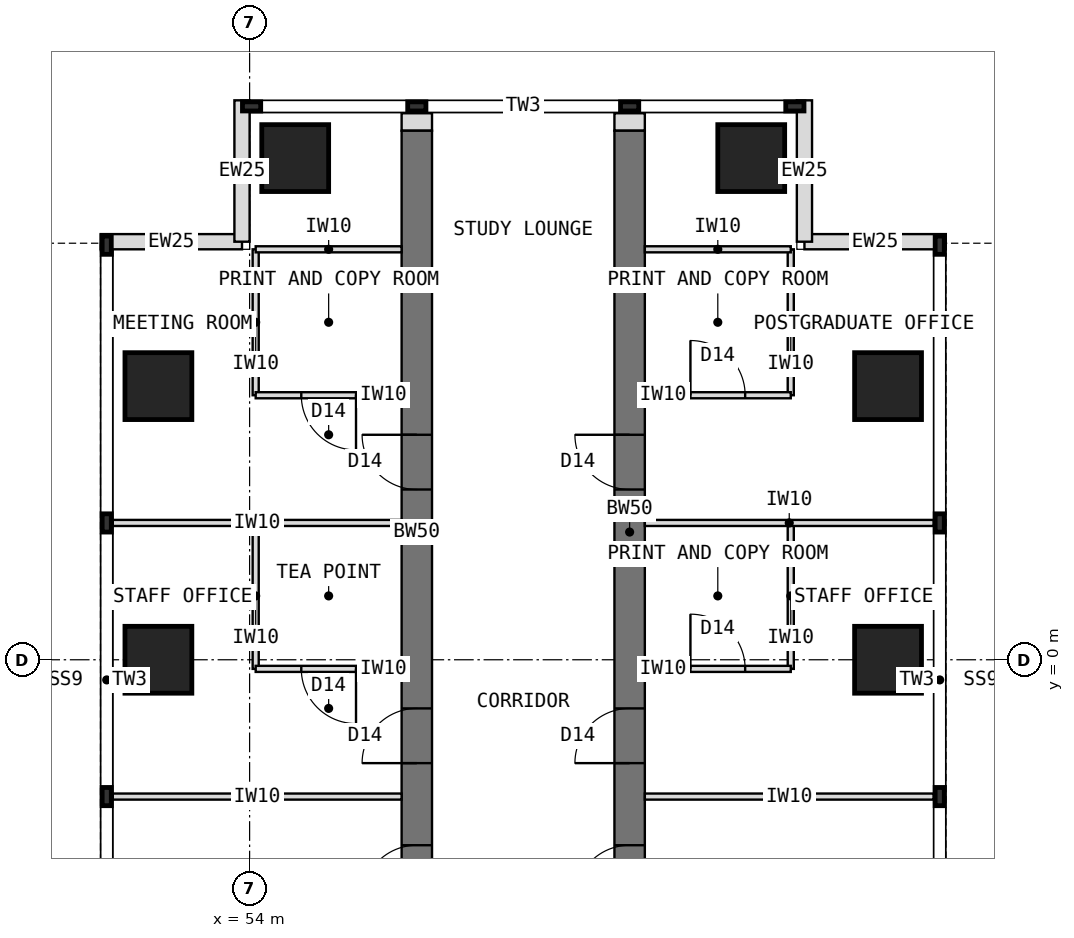
"""IFC4 building model, lengths in metres.
Left out: names, types, materials, properties, quantities, classifications, styles, units other than length and angle.
Written with IfcOpenShell. Run it as: python <this file> out.ifc"""

import sys

from ifc_helpers import new_model, si_unit, direction, frame, frame_2d, origin, origin_2d, place, context, subcontext, project, spatial, rectangle, extrude, element, fill, save


model = new_model("IFC4")
c1 = context("Model", 3, precision=1e-05, world=origin(), true_north=direction((0.0, 1.0)))
c2 = subcontext(c1, "Body", "Model", "MODEL_VIEW")
j1 = project(units=[si_unit("LENGTHUNIT", "METRE"), si_unit("PLANEANGLEUNIT", "RADIAN")], contexts=[c1])
p1 = place(None, origin())
s1 = spatial("IfcSite", under=j1, at=p1, CompositionType="ELEMENT")
p2 = place(p1, origin())
s2 = spatial("IfcBuilding", under=s1, at=p2, CompositionType="ELEMENT")
p3 = place(p2, frame((0.0, 0.0, 218.5)))
s3 = spatial("IfcBuildingStorey", under=s2, at=p3, CompositionType="ELEMENT", Elevation=218.5)
p4 = place(p3, frame((56.75, -4.5, 0.0), z_axis=(0.0, 0.0, 1.0), x_axis=(0.0, 1.0, 0.0)))
e1 = element("IfcWall", 1, at=p4, inside=s3, PredefinedType="SHEAR", context=c2, shape_type="SweptSolid", body=[
    extrude(rectangle(XDim=13.2, YDim=0.5, at=frame_2d((6.6, 0.0))), origin(), (0.0, 0.0, 1.0), 4.0),
])
p5 = place(p4, frame((0.55, 0.0, 0.0)))
e2 = element("IfcOpeningElement", 2, at=p5, cuts=e1, PredefinedType="OPENING", context=c2, shape_type="SweptSolid", body=[
    extrude(rectangle(XDim=0.9, YDim=2.1, at=frame_2d((0.45, 1.05))), frame((0.0, 0.26, 0.0), z_axis=(0.0, -1.0, 0.0), x_axis=(1.0, 0.0, 0.0)), (0.0, 0.0, 1.0), 0.52),
])
p6 = place(p4, frame((2.8, 0.0, 0.0)))
e3 = element("IfcOpeningElement", 3, at=p6, cuts=e1, PredefinedType="OPENING", context=c2, shape_type="SweptSolid", body=[
    extrude(rectangle(XDim=0.9, YDim=2.1, at=frame_2d((0.45, 1.05))), frame((0.0, 0.26, 0.0), z_axis=(0.0, -1.0, 0.0), x_axis=(1.0, 0.0, 0.0)), (0.0, 0.0, 1.0), 0.52),
])
p7 = place(p4, frame((7.3, 0.0, 0.0)))
e4 = element("IfcOpeningElement", 4, at=p7, cuts=e1, PredefinedType="OPENING", context=c2, shape_type="SweptSolid", body=[
    extrude(rectangle(XDim=0.9, YDim=2.1, at=frame_2d((0.45, 1.05))), frame((0.0, 0.26, 0.0), z_axis=(0.0, -1.0, 0.0), x_axis=(1.0, 0.0, 0.0)), (0.0, 0.0, 1.0), 0.52),
])
p8 = place(p3, frame((60.25, -4.5, 0.0), z_axis=(0.0, 0.0, 1.0), x_axis=(0.0, 1.0, 0.0)))
e5 = element("IfcWall", 5, at=p8, inside=s3, PredefinedType="SHEAR", context=c2, shape_type="SweptSolid", body=[
    extrude(rectangle(XDim=13.2, YDim=0.5, at=frame_2d((6.6, 0.0))), origin(), (0.0, 0.0, 1.0), 4.0),
])
p9 = place(p8, frame((0.55, 0.0, 0.0)))
e6 = element("IfcOpeningElement", 6, at=p9, cuts=e5, PredefinedType="OPENING", context=c2, shape_type="SweptSolid", body=[
    extrude(rectangle(XDim=0.9, YDim=2.1, at=frame_2d((0.45, 1.05))), frame((0.0, 0.26, 0.0), z_axis=(0.0, -1.0, 0.0), x_axis=(1.0, 0.0, 0.0)), (0.0, 0.0, 1.0), 0.52),
])
p10 = place(p8, frame((2.8, 0.0, 0.0)))
e7 = element("IfcOpeningElement", 7, at=p10, cuts=e5, PredefinedType="OPENING", context=c2, shape_type="SweptSolid", body=[
    extrude(rectangle(XDim=0.9, YDim=2.1, at=frame_2d((0.45, 1.05))), frame((0.0, 0.26, 0.0), z_axis=(0.0, -1.0, 0.0), x_axis=(1.0, 0.0, 0.0)), (0.0, 0.0, 1.0), 0.52),
])
p11 = place(p8, frame((7.3, 0.0, 0.0)))
e8 = element("IfcOpeningElement", 8, at=p11, cuts=e5, PredefinedType="OPENING", context=c2, shape_type="SweptSolid", body=[
    extrude(rectangle(XDim=0.9, YDim=2.1, at=frame_2d((0.45, 1.05))), frame((0.0, 0.26, 0.0), z_axis=(0.0, -1.0, 0.0), x_axis=(1.0, 0.0, 0.0)), (0.0, 0.0, 1.0), 0.52),
])
for number, where, z_axis, x_axis in (
    (9, (52.5, 0.0, 0.0), (0.0, 0.0, 1.0), (1.0, 0.0, 0.0)),
    (10, (64.5, 0.0, 0.0), (0.0, 0.0, 1.0), (1.0, 0.0, 0.0)),
    (11, (52.5, 4.5, 0.0), (0.0, 0.0, 1.0), (1.0, 0.0, 0.0)),
    (12, (64.5, 4.5, 0.0), (0.0, 0.0, 1.0), (1.0, 0.0, 0.0)),
    (13, (54.75, 8.25, 0.0), (0.0, 0.0, 1.0), (1.0, 0.0, 0.0)),
    (14, (62.25, 8.25, 0.0), (0.0, 0.0, 1.0), (1.0, 0.0, 0.0)),
):
    element("IfcColumn", number, at=place(p3, frame(where, z_axis=z_axis, x_axis=x_axis)), inside=s3, PredefinedType="COLUMN", context=c2, shape_type="SweptSolid", body=[
        extrude(rectangle(XDim=1.1, YDim=1.1, at=origin_2d()), origin(), (0.0, 0.0, 1.0), 4.0),
    ])
for number, where, z_axis, x_axis in (
    (15, (51.55, 6.875, 0.0), (0.0, 0.0, 1.0), (1.0, 0.0, 0.0)),
    (16, (53.875, 6.875, 0.0), (0.0, 0.0, 1.0), (0.0, 1.0, 0.0)),
    (17, (65.45, 6.875, 0.0), (0.0, 0.0, 1.0), (-1.0, 0.0, 0.0)),
    (18, (63.125, 6.875, 0.0), (0.0, 0.0, 1.0), (0.0, 1.0, 0.0)),
):
    element("IfcWall", number, at=place(p3, frame(where, z_axis=z_axis, x_axis=x_axis)), inside=s3, PredefinedType="STANDARD", context=c2, shape_type="SweptSolid", body=[
        extrude(rectangle(XDim=2.325, YDim=0.25, at=frame_2d((1.163, 0.0))), origin(), (0.0, 0.0, 1.0), 3.8),
    ])
for number, where, z_axis, x_axis in (
    (19, (56.75, 8.7, 0.0), (0.0, 0.0, 1.0), (0.0, 1.0, 0.0)),
    (20, (60.25, 8.7, 0.0), (0.0, 0.0, 1.0), (0.0, 1.0, 0.0)),
):
    element("IfcWall", number, at=place(p3, frame(where, z_axis=z_axis, x_axis=x_axis)), inside=s3, PredefinedType="PARTITIONING", context=c2, shape_type="SweptSolid", body=[
        extrude(rectangle(XDim=0.288, YDim=0.5, at=frame_2d((0.144, 0.0))), origin(), (0.0, 0.0, 1.0), 3.8),
    ])
for number, where, z_axis, x_axis in (
    (21, (56.5, -2.25, 0.0), (0.0, 0.0, 1.0), (-1.0, 0.0, 0.0)),
    (22, (56.5, 2.25, 0.0), (0.0, 0.0, 1.0), (-1.0, 0.0, 0.0)),
):
    element("IfcWall", number, at=place(p3, frame(where, z_axis=z_axis, x_axis=x_axis)), inside=s3, PredefinedType="PARTITIONING", context=c2, shape_type="SweptSolid", body=[
        extrude(rectangle(XDim=4.75, YDim=0.1, at=frame_2d((2.375, 0.0))), origin(), (0.0, 0.0, 1.0), 3.8),
    ])
p12 = place(p3, frame((54.1, -0.15, 0.0), z_axis=(0.0, 0.0, 1.0), x_axis=(0.0, 1.0, 0.0)))
e23 = element("IfcWall", 23, at=p12, inside=s3, PredefinedType="PARTITIONING", context=c2, shape_type="SweptSolid", body=[
    extrude(rectangle(XDim=2.4, YDim=0.1, at=frame_2d((1.2, 0.0))), origin(), (0.0, 0.0, 1.0), 3.8),
])
p13 = place(p3, frame((56.5, -0.15, 0.0), z_axis=(0.0, 0.0, 1.0), x_axis=(-1.0, 0.0, 0.0)))
e24 = element("IfcWall", 24, at=p13, inside=s3, PredefinedType="PARTITIONING", context=c2, shape_type="SweptSolid", body=[
    extrude(rectangle(XDim=2.4, YDim=0.1, at=frame_2d((1.2, 0.0))), origin(), (0.0, 0.0, 1.0), 3.8),
])
p14 = place(p13, frame((0.75, 0.0, 0.0)))
e25 = element("IfcOpeningElement", 25, at=p14, cuts=e24, PredefinedType="OPENING", context=c2, shape_type="SweptSolid", body=[
    extrude(rectangle(XDim=0.9, YDim=2.1, at=frame_2d((0.45, 1.05))), frame((0.0, 0.06, 0.0), z_axis=(0.0, -1.0, 0.0), x_axis=(1.0, 0.0, 0.0)), (0.0, 0.0, 1.0), 0.12),
])
p15 = place(p3, frame((54.1, 4.35, 0.0), z_axis=(0.0, 0.0, 1.0), x_axis=(0.0, 1.0, 0.0)))
e26 = element("IfcWall", 26, at=p15, inside=s3, PredefinedType="PARTITIONING", context=c2, shape_type="SweptSolid", body=[
    extrude(rectangle(XDim=2.4, YDim=0.1, at=frame_2d((1.2, 0.0))), origin(), (0.0, 0.0, 1.0), 3.8),
])
p16 = place(p3, frame((56.5, 4.35, 0.0), z_axis=(0.0, 0.0, 1.0), x_axis=(-1.0, 0.0, 0.0)))
e27 = element("IfcWall", 27, at=p16, inside=s3, PredefinedType="PARTITIONING", context=c2, shape_type="SweptSolid", body=[
    extrude(rectangle(XDim=2.4, YDim=0.1, at=frame_2d((1.2, 0.0))), origin(), (0.0, 0.0, 1.0), 3.8),
])
p17 = place(p16, frame((0.75, 0.0, 0.0)))
e28 = element("IfcOpeningElement", 28, at=p17, cuts=e27, PredefinedType="OPENING", context=c2, shape_type="SweptSolid", body=[
    extrude(rectangle(XDim=0.9, YDim=2.1, at=frame_2d((0.45, 1.05))), frame((0.0, 0.06, 0.0), z_axis=(0.0, -1.0, 0.0), x_axis=(1.0, 0.0, 0.0)), (0.0, 0.0, 1.0), 0.12),
])
p18 = place(p3, frame((56.5, 6.75, 0.0), z_axis=(0.0, 0.0, 1.0), x_axis=(-1.0, 0.0, 0.0)))
e29 = element("IfcWall", 29, at=p18, inside=s3, PredefinedType="PARTITIONING", context=c2, shape_type="SweptSolid", body=[
    extrude(rectangle(XDim=2.4, YDim=0.1, at=frame_2d((1.2, 0.0))), origin(), (0.0, 0.0, 1.0), 3.8),
])
for number, where, z_axis, x_axis in (
    (30, (60.5, -2.25, 0.0), (0.0, 0.0, 1.0), (1.0, 0.0, 0.0)),
    (31, (60.5, 2.25, 0.0), (0.0, 0.0, 1.0), (1.0, 0.0, 0.0)),
):
    element("IfcWall", number, at=place(p3, frame(where, z_axis=z_axis, x_axis=x_axis)), inside=s3, PredefinedType="PARTITIONING", context=c2, shape_type="SweptSolid", body=[
        extrude(rectangle(XDim=4.75, YDim=0.1, at=frame_2d((2.375, 0.0))), origin(), (0.0, 0.0, 1.0), 3.8),
    ])
p19 = place(p3, frame((62.9, -0.15, 0.0), z_axis=(0.0, 0.0, 1.0), x_axis=(0.0, 1.0, 0.0)))
e32 = element("IfcWall", 32, at=p19, inside=s3, PredefinedType="PARTITIONING", context=c2, shape_type="SweptSolid", body=[
    extrude(rectangle(XDim=2.4, YDim=0.1, at=frame_2d((1.2, 0.0))), origin(), (0.0, 0.0, 1.0), 3.8),
])
p20 = place(p3, frame((60.5, -0.15, 0.0), z_axis=(0.0, 0.0, 1.0), x_axis=(1.0, 0.0, 0.0)))
e33 = element("IfcWall", 33, at=p20, inside=s3, PredefinedType="PARTITIONING", context=c2, shape_type="SweptSolid", body=[
    extrude(rectangle(XDim=2.4, YDim=0.1, at=frame_2d((1.2, 0.0))), origin(), (0.0, 0.0, 1.0), 3.8),
])
p21 = place(p20, frame((0.75, 0.0, 0.0)))
e34 = element("IfcOpeningElement", 34, at=p21, cuts=e33, PredefinedType="OPENING", context=c2, shape_type="SweptSolid", body=[
    extrude(rectangle(XDim=0.9, YDim=2.1, at=frame_2d((0.45, 1.05))), frame((0.0, 0.06, 0.0), z_axis=(0.0, -1.0, 0.0), x_axis=(1.0, 0.0, 0.0)), (0.0, 0.0, 1.0), 0.12),
])
p22 = place(p3, frame((62.9, 4.35, 0.0), z_axis=(0.0, 0.0, 1.0), x_axis=(0.0, 1.0, 0.0)))
e35 = element("IfcWall", 35, at=p22, inside=s3, PredefinedType="PARTITIONING", context=c2, shape_type="SweptSolid", body=[
    extrude(rectangle(XDim=2.4, YDim=0.1, at=frame_2d((1.2, 0.0))), origin(), (0.0, 0.0, 1.0), 3.8),
])
p23 = place(p3, frame((60.5, 4.35, 0.0), z_axis=(0.0, 0.0, 1.0), x_axis=(1.0, 0.0, 0.0)))
e36 = element("IfcWall", 36, at=p23, inside=s3, PredefinedType="PARTITIONING", context=c2, shape_type="SweptSolid", body=[
    extrude(rectangle(XDim=2.4, YDim=0.1, at=frame_2d((1.2, 0.0))), origin(), (0.0, 0.0, 1.0), 3.8),
])
p24 = place(p23, frame((0.75, 0.0, 0.0)))
e37 = element("IfcOpeningElement", 37, at=p24, cuts=e36, PredefinedType="OPENING", context=c2, shape_type="SweptSolid", body=[
    extrude(rectangle(XDim=0.9, YDim=2.1, at=frame_2d((0.45, 1.05))), frame((0.0, 0.06, 0.0), z_axis=(0.0, -1.0, 0.0), x_axis=(1.0, 0.0, 0.0)), (0.0, 0.0, 1.0), 0.12),
])
p25 = place(p3, frame((60.5, 6.75, 0.0), z_axis=(0.0, 0.0, 1.0), x_axis=(1.0, 0.0, 0.0)))
e38 = element("IfcWall", 38, at=p25, inside=s3, PredefinedType="PARTITIONING", context=c2, shape_type="SweptSolid", body=[
    extrude(rectangle(XDim=2.4, YDim=0.1, at=frame_2d((1.2, 0.0))), origin(), (0.0, 0.0, 1.0), 3.8),
])
p26 = place(p14, origin())
e39 = element("IfcDoor", 39, at=p26, inside=s3, OperationType="SINGLE_SWING_LEFT", PredefinedType="DOOR", context=c2, shape_type="SweptSolid", body=[
    extrude(rectangle(XDim=0.9, YDim=2.1, at=frame_2d((0.45, 1.05))), frame((0.0, 0.025, 0.0), z_axis=(0.0, -1.0, 0.0), x_axis=(1.0, 0.0, 0.0)), (0.0, 0.0, 1.0), 0.05),
])
fill(e25, e39)
p27 = place(p17, origin())
e40 = element("IfcDoor", 40, at=p27, inside=s3, OperationType="SINGLE_SWING_LEFT", PredefinedType="DOOR", context=c2, shape_type="SweptSolid", body=[
    extrude(rectangle(XDim=0.9, YDim=2.1, at=frame_2d((0.45, 1.05))), frame((0.0, 0.025, 0.0), z_axis=(0.0, -1.0, 0.0), x_axis=(1.0, 0.0, 0.0)), (0.0, 0.0, 1.0), 0.05),
])
fill(e28, e40)
p28 = place(p21, origin())
e41 = element("IfcDoor", 41, at=p28, inside=s3, OperationType="SINGLE_SWING_LEFT", PredefinedType="DOOR", context=c2, shape_type="SweptSolid", body=[
    extrude(rectangle(XDim=0.9, YDim=2.1, at=frame_2d((0.45, 1.05))), frame((0.0, 0.025, 0.0), z_axis=(0.0, -1.0, 0.0), x_axis=(1.0, 0.0, 0.0)), (0.0, 0.0, 1.0), 0.05),
])
fill(e34, e41)
p29 = place(p24, origin())
e42 = element("IfcDoor", 42, at=p29, inside=s3, OperationType="SINGLE_SWING_LEFT", PredefinedType="DOOR", context=c2, shape_type="SweptSolid", body=[
    extrude(rectangle(XDim=0.9, YDim=2.1, at=frame_2d((0.45, 1.05))), frame((0.0, 0.025, 0.0), z_axis=(0.0, -1.0, 0.0), x_axis=(1.0, 0.0, 0.0)), (0.0, 0.0, 1.0), 0.05),
])
fill(e37, e42)
p30 = place(p5, origin())
e43 = element("IfcDoor", 43, at=p30, inside=s3, OperationType="SINGLE_SWING_LEFT", PredefinedType="DOOR", context=c2, shape_type="SweptSolid", body=[
    extrude(rectangle(XDim=0.9, YDim=2.1, at=frame_2d((0.45, 1.05))), frame((0.0, 0.025, 0.0), z_axis=(0.0, -1.0, 0.0), x_axis=(1.0, 0.0, 0.0)), (0.0, 0.0, 1.0), 0.05),
])
fill(e2, e43)
p31 = place(p6, origin())
e44 = element("IfcDoor", 44, at=p31, inside=s3, OperationType="SINGLE_SWING_LEFT", PredefinedType="DOOR", context=c2, shape_type="SweptSolid", body=[
    extrude(rectangle(XDim=0.9, YDim=2.1, at=frame_2d((0.45, 1.05))), frame((0.0, 0.025, 0.0), z_axis=(0.0, -1.0, 0.0), x_axis=(1.0, 0.0, 0.0)), (0.0, 0.0, 1.0), 0.05),
])
fill(e3, e44)
p32 = place(p7, origin())
e45 = element("IfcDoor", 45, at=p32, inside=s3, OperationType="SINGLE_SWING_RIGHT", PredefinedType="DOOR", context=c2, shape_type="SweptSolid", body=[
    extrude(rectangle(XDim=0.9, YDim=2.1, at=frame_2d((0.45, 1.05))), frame((0.0, 0.025, 0.0), z_axis=(0.0, -1.0, 0.0), x_axis=(1.0, 0.0, 0.0)), (0.0, 0.0, 1.0), 0.05),
])
fill(e4, e45)
p33 = place(p9, origin())
e46 = element("IfcDoor", 46, at=p33, inside=s3, OperationType="SINGLE_SWING_LEFT", PredefinedType="DOOR", context=c2, shape_type="SweptSolid", body=[
    extrude(rectangle(XDim=0.9, YDim=2.1, at=frame_2d((0.45, 1.05))), frame((0.0, 0.025, 0.0), z_axis=(0.0, -1.0, 0.0), x_axis=(1.0, 0.0, 0.0)), (0.0, 0.0, 1.0), 0.05),
])
fill(e6, e46)
p34 = place(p10, origin())
e47 = element("IfcDoor", 47, at=p34, inside=s3, OperationType="SINGLE_SWING_LEFT", PredefinedType="DOOR", context=c2, shape_type="SweptSolid", body=[
    extrude(rectangle(XDim=0.9, YDim=2.1, at=frame_2d((0.45, 1.05))), frame((0.0, 0.025, 0.0), z_axis=(0.0, -1.0, 0.0), x_axis=(1.0, 0.0, 0.0)), (0.0, 0.0, 1.0), 0.05),
])
fill(e7, e47)
p35 = place(p11, origin())
e48 = element("IfcDoor", 48, at=p35, inside=s3, OperationType="SINGLE_SWING_RIGHT", PredefinedType="DOOR", context=c2, shape_type="SweptSolid", body=[
    extrude(rectangle(XDim=0.9, YDim=2.1, at=frame_2d((0.45, 1.05))), frame((0.0, 0.025, 0.0), z_axis=(0.0, -1.0, 0.0), x_axis=(1.0, 0.0, 0.0)), (0.0, 0.0, 1.0), 0.05),
])
fill(e8, e48)
save(model, sys.argv[1])
